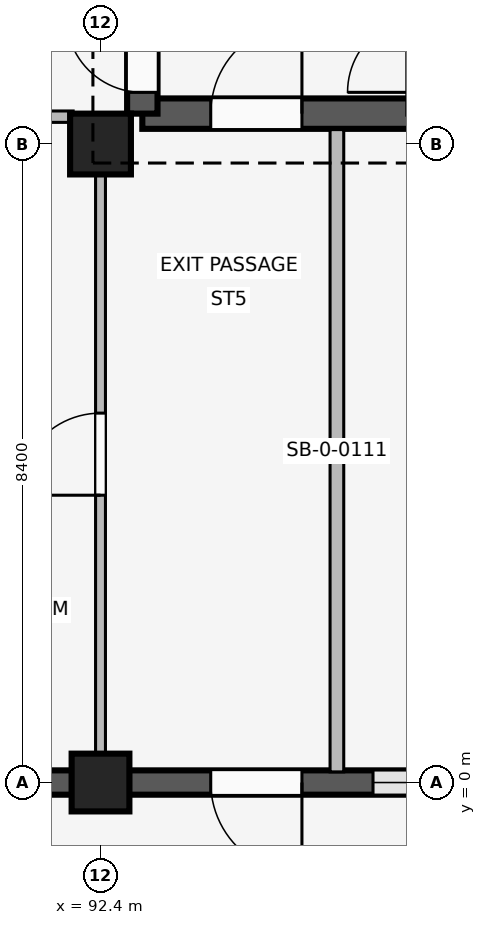
"""IFC4 building model, lengths in metres.
Left out: names, types, materials, properties, quantities, classifications, styles, units other than length and angle.
Written with IfcOpenShell. Run it as: python <this file> out.ifc"""

import sys

from ifc_helpers import new_model, si_unit, direction, frame, frame_2d, origin, origin_2d, place, context, subcontext, project, spatial, rectangle, extrude, element, fill, save


model = new_model("IFC4")
c1 = context("Model", 3, precision=1e-05, world=origin(), true_north=direction((0.0, 1.0)))
c2 = subcontext(c1, "Body", "Model", "MODEL_VIEW")
j1 = project(units=[si_unit("LENGTHUNIT", "METRE"), si_unit("PLANEANGLEUNIT", "RADIAN")], contexts=[c1])
p1 = place(None, origin())
s1 = spatial("IfcSite", under=j1, at=p1, CompositionType="ELEMENT")
p2 = place(p1, origin())
s2 = spatial("IfcBuilding", under=s1, at=p2, CompositionType="ELEMENT")
p3 = place(p2, origin())
s3 = spatial("IfcBuildingStorey", under=s2, at=p3, CompositionType="ELEMENT", Elevation=0.0)
p4 = place(p3, frame((92.4, 0.0, 0.0), z_axis=(0.0, 0.0, 1.0), x_axis=(1.0, 0.0, 0.0)))
e1 = element("IfcColumn", 1, at=p4, inside=s3, PredefinedType="COLUMN", context=c2, shape_type="SweptSolid", body=[
    extrude(rectangle(XDim=0.76, YDim=0.76, at=origin_2d()), origin(), (0.0, 0.0, 1.0), 4.8),
])
p5 = place(p3, frame((92.4, 8.4, 0.0), z_axis=(0.0, 0.0, 1.0), x_axis=(1.0, 0.0, 0.0)))
e2 = element("IfcColumn", 2, at=p5, inside=s3, PredefinedType="COLUMN", context=c2, shape_type="SweptSolid", body=[
    extrude(rectangle(XDim=0.8, YDim=0.8, at=origin_2d()), origin(), (0.0, 0.0, 1.0), 4.8),
])
p6 = place(p3, frame((92.025, 0.0, 0.0), z_axis=(0.0, 0.0, 1.0), x_axis=(-1.0, 0.0, 0.0)))
e3 = element("IfcWall", 3, at=p6, inside=s3, PredefinedType="SOLIDWALL", context=c2, shape_type="SweptSolid", body=[
    extrude(rectangle(XDim=7.65, YDim=0.32, at=frame_2d((3.825, 0.0))), origin(), (0.0, 0.0, 1.0), 3.82),
])
p7 = place(p6, frame((5.061, 0.0, 0.85)))
e4 = element("IfcOpeningElement", 4, at=p7, cuts=e3, PredefinedType="OPENING", context=c2, shape_type="SweptSolid", body=[
    extrude(rectangle(XDim=1.66, YDim=1.95, at=frame_2d((0.83, 0.975))), frame((0.0, 0.17, 0.0), z_axis=(0.0, -1.0, 0.0), x_axis=(1.0, 0.0, 0.0)), (0.0, 0.0, 1.0), 0.34),
])
p8 = place(p3, frame((100.425, 0.0, 0.0), z_axis=(0.0, 0.0, 1.0), x_axis=(-1.0, 0.0, 0.0)))
e5 = element("IfcWall", 5, at=p8, inside=s3, PredefinedType="SOLIDWALL", context=c2, shape_type="SweptSolid", body=[
    extrude(rectangle(XDim=7.65, YDim=0.32, at=frame_2d((3.825, 0.0))), origin(), (0.0, 0.0, 1.0), 3.82),
])
p9 = place(p8, frame((5.375, 0.0, 0.0)))
e6 = element("IfcOpeningElement", 6, at=p9, cuts=e5, PredefinedType="OPENING", context=c2, shape_type="SweptSolid", body=[
    extrude(rectangle(XDim=1.2, YDim=2.25, at=frame_2d((0.6, 1.125))), frame((0.0, 0.17, 0.0), z_axis=(0.0, -1.0, 0.0), x_axis=(1.0, 0.0, 0.0)), (0.0, 0.0, 1.0), 0.34),
])
p10 = place(p8, frame((0.8, 0.0, 0.85)))
e7 = element("IfcOpeningElement", 7, at=p10, cuts=e5, PredefinedType="OPENING", context=c2, shape_type="SweptSolid", body=[
    extrude(rectangle(XDim=1.54, YDim=1.85, at=frame_2d((0.77, 0.925))), frame((0.0, 0.17, 0.0), z_axis=(0.0, -1.0, 0.0), x_axis=(1.0, 0.0, 0.0)), (0.0, 0.0, 1.0), 0.34),
])
p11 = place(p8, frame((2.9, 0.0, 0.85)))
e8 = element("IfcOpeningElement", 8, at=p11, cuts=e5, PredefinedType="OPENING", context=c2, shape_type="SweptSolid", body=[
    extrude(rectangle(XDim=1.54, YDim=1.85, at=frame_2d((0.77, 0.925))), frame((0.0, 0.17, 0.0), z_axis=(0.0, -1.0, 0.0), x_axis=(1.0, 0.0, 0.0)), (0.0, 0.0, 1.0), 0.34),
])
p12 = place(p3, frame((92.95, 8.8, 0.0), z_axis=(0.0, 0.0, 1.0), x_axis=(1.0, 0.0, 0.0)))
e9 = element("IfcWall", 9, at=p12, inside=s3, PredefinedType="SHEAR", context=c2, shape_type="SweptSolid", body=[
    extrude(rectangle(XDim=7.5, YDim=0.4, at=frame_2d((3.75, 0.0))), origin(), (0.0, 0.0, 1.0), 4.52),
])
p13 = place(p12, frame((4.85, 0.0, 0.0)))
e10 = element("IfcOpeningElement", 10, at=p13, cuts=e9, PredefinedType="OPENING", context=c2, shape_type="SweptSolid", body=[
    extrude(rectangle(XDim=1.2, YDim=2.2, at=frame_2d((0.6, 1.1))), frame((0.0, 0.21, 0.0), z_axis=(0.0, -1.0, 0.0), x_axis=(1.0, 0.0, 0.0)), (0.0, 0.0, 1.0), 0.42),
])
p14 = place(p12, frame((0.9, 0.0, 0.0)))
e11 = element("IfcOpeningElement", 11, at=p14, cuts=e9, PredefinedType="OPENING", context=c2, shape_type="SweptSolid", body=[
    extrude(rectangle(XDim=1.2, YDim=2.2, at=frame_2d((0.6, 1.1))), frame((0.0, 0.21, 0.0), z_axis=(0.0, -1.0, 0.0), x_axis=(1.0, 0.0, 0.0)), (0.0, 0.0, 1.0), 0.42),
])
p15 = place(p3, frame((92.95, 8.8, 0.0), z_axis=(0.0, 0.0, 1.0), x_axis=(0.0, 1.0, 0.0)))
e12 = element("IfcWall", 12, at=p15, inside=s3, PredefinedType="SHEAR", context=c2, shape_type="SweptSolid", body=[
    extrude(rectangle(XDim=7.55, YDim=0.4, at=frame_2d((3.775, 0.0))), origin(), (0.0, 0.0, 1.0), 4.52),
])
p16 = place(p15, frame((0.28, 0.0, 0.0)))
e13 = element("IfcOpeningElement", 13, at=p16, cuts=e12, PredefinedType="OPENING", context=c2, shape_type="SweptSolid", body=[
    extrude(rectangle(XDim=1.0, YDim=2.15, at=frame_2d((0.5, 1.075))), frame((0.0, 0.21, 0.0), z_axis=(0.0, -1.0, 0.0), x_axis=(1.0, 0.0, 0.0)), (0.0, 0.0, 1.0), 0.42),
])
p17 = place(p3, frame((89.86, 8.76, 0.0), z_axis=(0.0, 0.0, 1.0), x_axis=(1.0, 0.0, 0.0)))
e14 = element("IfcWall", 14, at=p17, inside=s3, PredefinedType="PARTITIONING", context=c2, shape_type="SweptSolid", body=[
    extrude(rectangle(XDim=2.18, YDim=0.15, at=frame_2d((1.09, 0.0))), origin(), (0.0, 0.0, 1.0), 3.8),
])
p18 = place(p17, frame((0.5, 0.0, 0.0)))
e15 = element("IfcOpeningElement", 15, at=p18, cuts=e14, PredefinedType="OPENING", context=c2, shape_type="SweptSolid", body=[
    extrude(rectangle(XDim=1.08, YDim=2.15, at=frame_2d((0.54, 1.075))), frame((0.0, 0.085, 0.0), z_axis=(0.0, -1.0, 0.0), x_axis=(1.0, 0.0, 0.0)), (0.0, 0.0, 1.0), 0.17),
])
p19 = place(p3, frame((92.4, 0.14, 0.0), z_axis=(0.0, 0.0, 1.0), x_axis=(0.0, 1.0, 0.0)))
e16 = element("IfcWall", 16, at=p19, inside=s3, PredefinedType="PARTITIONING", context=c2, shape_type="SweptSolid", body=[
    extrude(rectangle(XDim=8.21, YDim=0.13, at=frame_2d((4.105, 0.0))), origin(), (0.0, 0.0, 1.0), 3.8),
])
p20 = place(p19, frame((3.64, 0.0, 0.0)))
e17 = element("IfcOpeningElement", 17, at=p20, cuts=e16, PredefinedType="OPENING", context=c2, shape_type="SweptSolid", body=[
    extrude(rectangle(XDim=1.08, YDim=2.15, at=frame_2d((0.54, 1.075))), frame((0.0, 0.075, 0.0), z_axis=(0.0, -1.0, 0.0), x_axis=(1.0, 0.0, 0.0)), (0.0, 0.0, 1.0), 0.15),
])
p21 = place(p3, frame((95.51, 0.14, 0.0), z_axis=(0.0, 0.0, 1.0), x_axis=(0.0, 1.0, 0.0)))
e18 = element("IfcWall", 18, at=p21, inside=s3, PredefinedType="PARTITIONING", context=c2, shape_type="SweptSolid", body=[
    extrude(rectangle(XDim=8.45, YDim=0.18, at=frame_2d((4.225, 0.0))), origin(), (0.0, 0.0, 1.0), 3.8),
])
p22 = place(p9, origin())
e19 = element("IfcDoor", 19, at=p22, inside=s3, OperationType="SINGLE_SWING_LEFT", PredefinedType="DOOR", context=c2, shape_type="SweptSolid", body=[
    extrude(rectangle(XDim=1.2, YDim=2.25, at=frame_2d((0.6, 1.125))), frame((0.0, 0.025, 0.0), z_axis=(0.0, -1.0, 0.0), x_axis=(1.0, 0.0, 0.0)), (0.0, 0.0, 1.0), 0.05),
])
fill(e6, e19)
p23 = place(p11, origin())
e20 = element("IfcWindow", 20, at=p23, inside=s3, PartitioningType="SINGLE_PANEL", PredefinedType="WINDOW", context=c2, shape_type="SweptSolid", body=[
    extrude(rectangle(XDim=1.54, YDim=1.85, at=frame_2d((0.77, 0.925))), frame((0.0, 0.03, 0.0), z_axis=(0.0, -1.0, 0.0), x_axis=(1.0, 0.0, 0.0)), (0.0, 0.0, 1.0), 0.06),
])
fill(e8, e20)
p24 = place(p16, origin())
e21 = element("IfcDoor", 21, at=p24, inside=s3, OperationType="SINGLE_SWING_RIGHT", PredefinedType="DOOR", context=c2, shape_type="SweptSolid", body=[
    extrude(rectangle(XDim=1.0, YDim=2.15, at=frame_2d((0.5, 1.075))), frame((0.0, 0.025, 0.0), z_axis=(0.0, -1.0, 0.0), x_axis=(1.0, 0.0, 0.0)), (0.0, 0.0, 1.0), 0.05),
])
fill(e13, e21)
p25 = place(p14, origin())
e22 = element("IfcDoor", 22, at=p25, inside=s3, OperationType="SINGLE_SWING_RIGHT", PredefinedType="DOOR", context=c2, shape_type="SweptSolid", body=[
    extrude(rectangle(XDim=1.2, YDim=2.2, at=frame_2d((0.6, 1.1))), frame((0.0, 0.025, 0.0), z_axis=(0.0, -1.0, 0.0), x_axis=(1.0, 0.0, 0.0)), (0.0, 0.0, 1.0), 0.05),
])
fill(e11, e22)
p26 = place(p20, origin())
e23 = element("IfcDoor", 23, at=p26, inside=s3, OperationType="SINGLE_SWING_LEFT", PredefinedType="DOOR", context=c2, shape_type="SweptSolid", body=[
    extrude(rectangle(XDim=1.08, YDim=2.15, at=frame_2d((0.54, 1.075))), frame((0.0, 0.025, 0.0), z_axis=(0.0, -1.0, 0.0), x_axis=(1.0, 0.0, 0.0)), (0.0, 0.0, 1.0), 0.05),
])
fill(e17, e23)
save(model, sys.argv[1])
